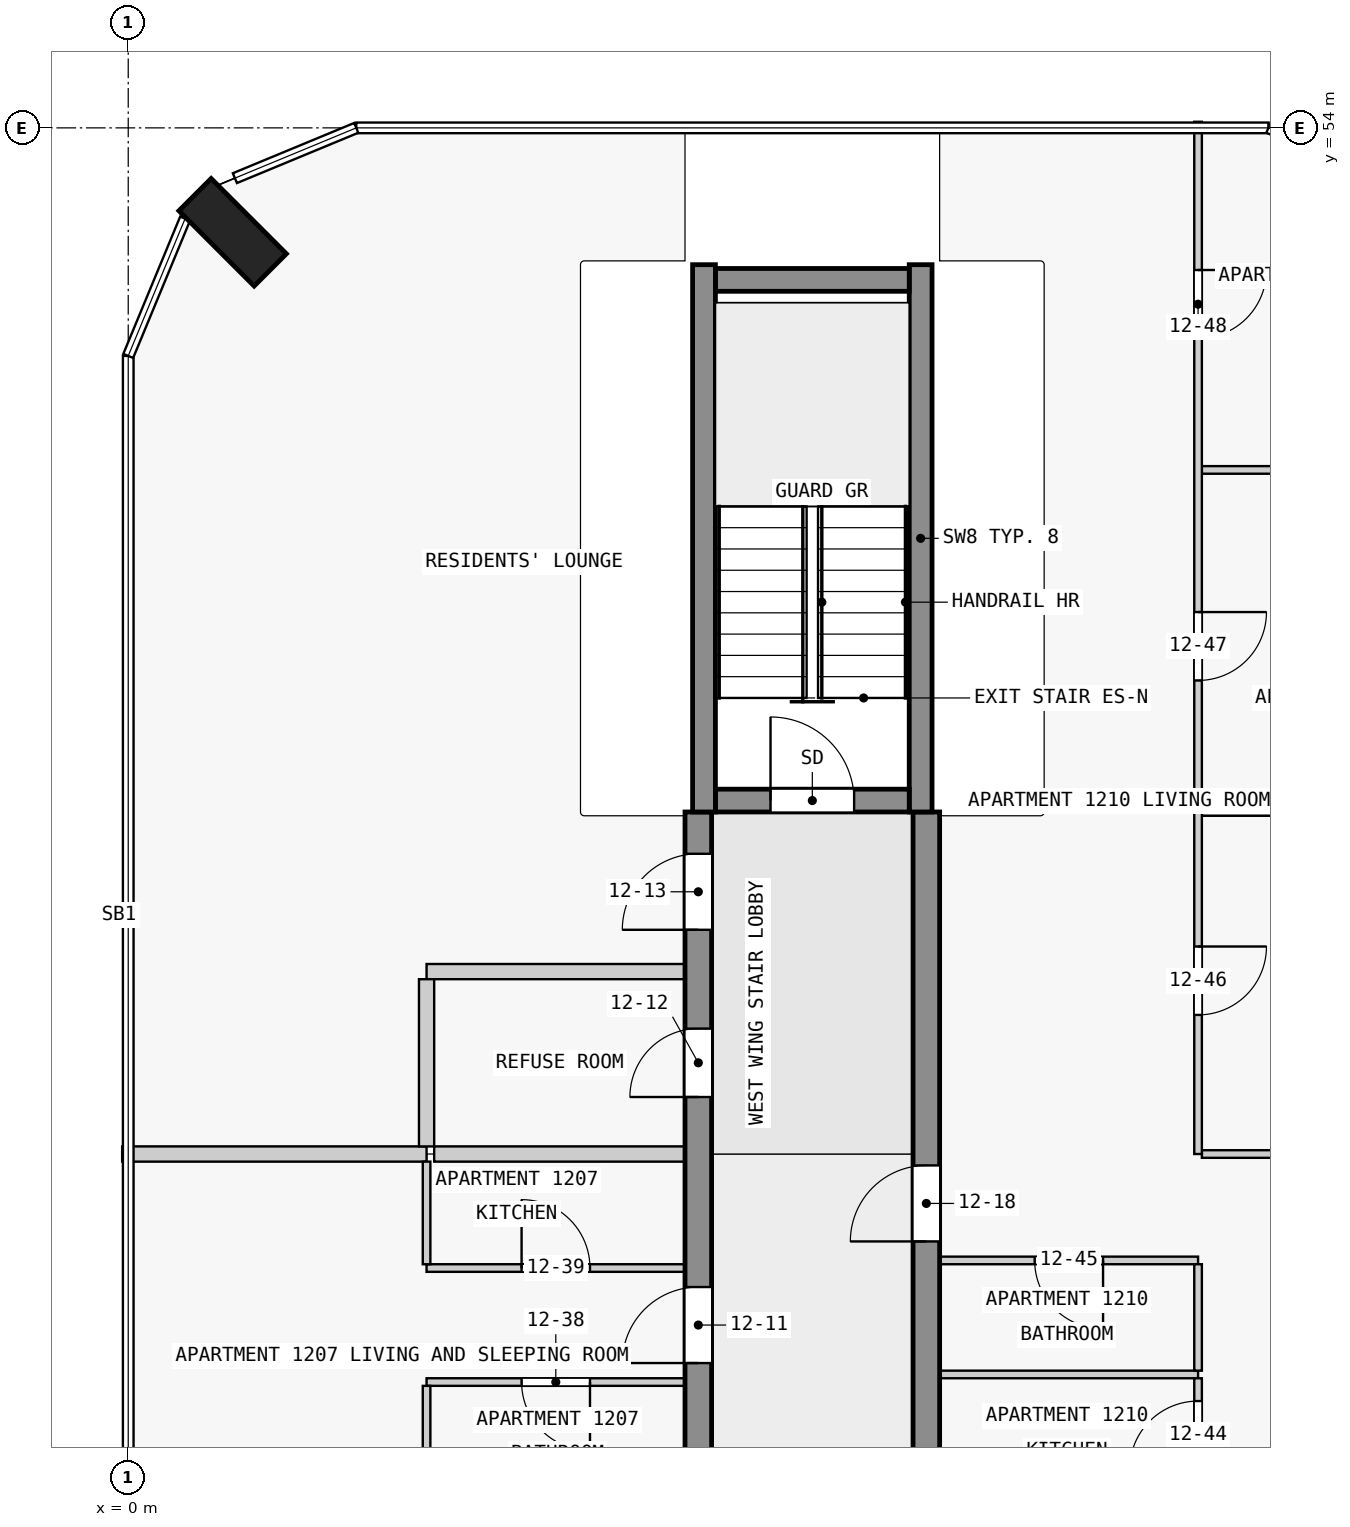
"""IFC4 building model, lengths in metres.
Left out: names, types, materials, properties, quantities, classifications, styles, units other than length and angle.
Written with IfcOpenShell. Run it as: python <this file> out.ifc"""

import sys

from ifc_helpers import new_model, si_unit, direction, frame, frame_2d, origin, origin_2d, place, context, subcontext, project, spatial, rectangle, extrude, element, fill, save


model = new_model("IFC4")
c1 = context("Model", 3, precision=1e-05, world=origin(), true_north=direction((0.0, 1.0)))
c2 = subcontext(c1, "Body", "Model", "MODEL_VIEW")
j1 = project(units=[si_unit("LENGTHUNIT", "METRE"), si_unit("PLANEANGLEUNIT", "RADIAN")], contexts=[c1])
p1 = place(None, origin())
s1 = spatial("IfcSite", under=j1, at=p1, CompositionType="ELEMENT")
p2 = place(p1, origin())
s2 = spatial("IfcBuilding", under=s1, at=p2, CompositionType="ELEMENT")
p3 = place(p2, frame((0.0, 0.0, 51.3)))
s3 = spatial("IfcBuildingStorey", under=s2, at=p3, CompositionType="ELEMENT", Elevation=51.3)
p4 = place(p3, frame((1.374, 52.626, 0.0), z_axis=(0.0, 0.0, 1.0), x_axis=(0.707106781187, 0.707106781187, 0.0)))
e1 = element("IfcColumn", 1, at=p4, inside=s3, PredefinedType="COLUMN", context=c2, shape_type="SweptSolid", body=[
    extrude(rectangle(XDim=0.6, YDim=1.4, at=origin_2d()), origin(), (0.0, 0.0, 1.0), 3.5),
])
p5 = place(p3, frame((7.725, 45.15, 0.0), z_axis=(0.0, 0.0, 1.0), x_axis=(1.0, 0.0, 0.0)))
e2 = element("IfcWall", 2, at=p5, inside=s3, PredefinedType="SHEAR", context=c2, shape_type="SweptSolid", body=[
    extrude(rectangle(XDim=2.55, YDim=0.3, at=frame_2d((1.275, 0.0))), origin(), (0.0, 0.0, 1.0), 3.5),
])
p6 = place(p5, frame((0.725, 0.0, 0.0)))
e3 = element("IfcOpeningElement", 3, at=p6, cuts=e2, PredefinedType="OPENING", context=c2, shape_type="SweptSolid", body=[
    extrude(rectangle(XDim=1.1, YDim=2.1, at=frame_2d((0.55, 1.05))), frame((0.0, 0.16, 0.0), z_axis=(0.0, -1.0, 0.0), x_axis=(1.0, 0.0, 0.0)), (0.0, 0.0, 1.0), 0.32),
])
p7 = place(p3, frame((7.725, 52.0, 0.0), z_axis=(0.0, 0.0, 1.0), x_axis=(1.0, 0.0, 0.0)))
e4 = element("IfcWall", 4, at=p7, inside=s3, PredefinedType="SHEAR", context=c2, shape_type="SweptSolid", body=[
    extrude(rectangle(XDim=2.55, YDim=0.3, at=frame_2d((1.275, 0.0))), origin(), (0.0, 0.0, 1.0), 3.5),
])
for number, where, z_axis, x_axis in (
    (5, (7.575, 45.0, 0.0), (0.0, 0.0, 1.0), (0.0, 1.0, 0.0)),
    (6, (10.425, 45.0, 0.0), (0.0, 0.0, 1.0), (0.0, 1.0, 0.0)),
):
    element("IfcWall", number, at=place(p3, frame(where, z_axis=z_axis, x_axis=x_axis)), inside=s3, PredefinedType="SHEAR", context=c2, shape_type="SweptSolid", body=[
        extrude(rectangle(XDim=7.2, YDim=0.3, at=frame_2d((3.6, 0.0))), origin(), (0.0, 0.0, 1.0), 3.5),
    ])
p8 = place(p3, frame((7.5, 18.0, 0.0), z_axis=(0.0, 0.0, 1.0), x_axis=(0.0, 1.0, 0.0)))
e7 = element("IfcWall", 7, at=p8, inside=s3, PredefinedType="SHEAR", context=c2, shape_type="SweptSolid", body=[
    extrude(rectangle(XDim=27.0, YDim=0.35, at=frame_2d((13.5, 0.0))), origin(), (0.0, 0.0, 1.0), 3.25),
])
p9 = place(p8, frame((4.75, 0.0, 0.0)))
e8 = element("IfcOpeningElement", 8, at=p9, cuts=e7, PredefinedType="OPENING", context=c2, shape_type="SweptSolid", body=[
    extrude(rectangle(XDim=1.0, YDim=2.1, at=frame_2d((0.5, 1.05))), frame((0.0, 0.185, 0.0), z_axis=(0.0, -1.0, 0.0), x_axis=(1.0, 0.0, 0.0)), (0.0, 0.0, 1.0), 0.37),
])
p10 = place(p8, frame((15.25, 0.0, 0.0)))
e9 = element("IfcOpeningElement", 9, at=p10, cuts=e7, PredefinedType="OPENING", context=c2, shape_type="SweptSolid", body=[
    extrude(rectangle(XDim=1.0, YDim=2.1, at=frame_2d((0.5, 1.05))), frame((0.0, 0.185, 0.0), z_axis=(0.0, -1.0, 0.0), x_axis=(1.0, 0.0, 0.0)), (0.0, 0.0, 1.0), 0.37),
])
p11 = place(p8, frame((19.75, 0.0, 0.0)))
e10 = element("IfcOpeningElement", 10, at=p11, cuts=e7, PredefinedType="OPENING", context=c2, shape_type="SweptSolid", body=[
    extrude(rectangle(XDim=1.0, YDim=2.1, at=frame_2d((0.5, 1.05))), frame((0.0, 0.185, 0.0), z_axis=(0.0, -1.0, 0.0), x_axis=(1.0, 0.0, 0.0)), (0.0, 0.0, 1.0), 0.37),
])
p12 = place(p8, frame((23.25, 0.0, 0.0)))
e11 = element("IfcOpeningElement", 11, at=p12, cuts=e7, PredefinedType="OPENING", context=c2, shape_type="SweptSolid", body=[
    extrude(rectangle(XDim=0.9, YDim=2.1, at=frame_2d((0.45, 1.05))), frame((0.0, 0.185, 0.0), z_axis=(0.0, -1.0, 0.0), x_axis=(1.0, 0.0, 0.0)), (0.0, 0.0, 1.0), 0.37),
])
p13 = place(p8, frame((25.45, 0.0, 0.0)))
e12 = element("IfcOpeningElement", 12, at=p13, cuts=e7, PredefinedType="OPENING", context=c2, shape_type="SweptSolid", body=[
    extrude(rectangle(XDim=1.0, YDim=2.1, at=frame_2d((0.5, 1.05))), frame((0.0, 0.185, 0.0), z_axis=(0.0, -1.0, 0.0), x_axis=(1.0, 0.0, 0.0)), (0.0, 0.0, 1.0), 0.37),
])
p14 = place(p3, frame((10.5, 18.0, 0.0), z_axis=(0.0, 0.0, 1.0), x_axis=(0.0, 1.0, 0.0)))
e13 = element("IfcWall", 13, at=p14, inside=s3, PredefinedType="SHEAR", context=c2, shape_type="SweptSolid", body=[
    extrude(rectangle(XDim=27.0, YDim=0.35, at=frame_2d((13.5, 0.0))), origin(), (0.0, 0.0, 1.0), 3.25),
])
p15 = place(p14, frame((1.75, 0.0, 0.0)))
e14 = element("IfcOpeningElement", 14, at=p15, cuts=e13, PredefinedType="OPENING", context=c2, shape_type="SweptSolid", body=[
    extrude(rectangle(XDim=1.0, YDim=2.1, at=frame_2d((0.5, 1.05))), frame((0.0, 0.185, 0.0), z_axis=(0.0, -1.0, 0.0), x_axis=(1.0, 0.0, 0.0)), (0.0, 0.0, 1.0), 0.37),
])
p16 = place(p14, frame((6.25, 0.0, 0.0)))
e15 = element("IfcOpeningElement", 15, at=p16, cuts=e13, PredefinedType="OPENING", context=c2, shape_type="SweptSolid", body=[
    extrude(rectangle(XDim=1.0, YDim=2.1, at=frame_2d((0.5, 1.05))), frame((0.0, 0.185, 0.0), z_axis=(0.0, -1.0, 0.0), x_axis=(1.0, 0.0, 0.0)), (0.0, 0.0, 1.0), 0.37),
])
p17 = place(p14, frame((10.75, 0.0, 0.0)))
e16 = element("IfcOpeningElement", 16, at=p17, cuts=e13, PredefinedType="OPENING", context=c2, shape_type="SweptSolid", body=[
    extrude(rectangle(XDim=1.0, YDim=2.1, at=frame_2d((0.5, 1.05))), frame((0.0, 0.185, 0.0), z_axis=(0.0, -1.0, 0.0), x_axis=(1.0, 0.0, 0.0)), (0.0, 0.0, 1.0), 0.37),
])
p18 = place(p14, frame((15.25, 0.0, 0.0)))
e17 = element("IfcOpeningElement", 17, at=p18, cuts=e13, PredefinedType="OPENING", context=c2, shape_type="SweptSolid", body=[
    extrude(rectangle(XDim=1.0, YDim=2.1, at=frame_2d((0.5, 1.05))), frame((0.0, 0.185, 0.0), z_axis=(0.0, -1.0, 0.0), x_axis=(1.0, 0.0, 0.0)), (0.0, 0.0, 1.0), 0.37),
])
p19 = place(p14, frame((21.35, 0.0, 0.0)))
e18 = element("IfcOpeningElement", 18, at=p19, cuts=e13, PredefinedType="OPENING", context=c2, shape_type="SweptSolid", body=[
    extrude(rectangle(XDim=1.0, YDim=2.1, at=frame_2d((0.5, 1.05))), frame((0.0, 0.185, 0.0), z_axis=(0.0, -1.0, 0.0), x_axis=(1.0, 0.0, 0.0)), (0.0, 0.0, 1.0), 0.37),
])
p20 = place(p3, frame((7.325, 37.5, 0.0), z_axis=(0.0, 0.0, 1.0), x_axis=(-1.0, 0.0, 0.0)))
e19 = element("IfcWall", 19, at=p20, inside=s3, PredefinedType="PARTITIONING", context=c2, shape_type="SweptSolid", body=[
    extrude(rectangle(XDim=3.4, YDim=0.1, at=frame_2d((1.7, 0.0))), origin(), (0.0, 0.0, 1.0), 3.25),
])
p21 = place(p20, frame((1.25, 0.0, 0.0)))
e20 = element("IfcOpeningElement", 20, at=p21, cuts=e19, PredefinedType="OPENING", context=c2, shape_type="SweptSolid", body=[
    extrude(rectangle(XDim=0.9, YDim=2.1, at=frame_2d((0.45, 1.05))), frame((0.0, 0.06, 0.0), z_axis=(0.0, -1.0, 0.0), x_axis=(1.0, 0.0, 0.0)), (0.0, 0.0, 1.0), 0.12),
])
p22 = place(p3, frame((14.075, 37.6, 0.0), z_axis=(0.0, 0.0, 1.0), x_axis=(-1.0, 0.0, 0.0)))
e21 = element("IfcWall", 21, at=p22, inside=s3, PredefinedType="PARTITIONING", context=c2, shape_type="SweptSolid", body=[
    extrude(rectangle(XDim=3.4, YDim=0.1, at=frame_2d((1.7, 0.0))), origin(), (0.0, 0.0, 1.0), 3.25),
])
p23 = place(p3, frame((3.925, 39.0, 0.0), z_axis=(0.0, 0.0, 1.0), x_axis=(1.0, 0.0, 0.0)))
e22 = element("IfcWall", 22, at=p23, inside=s3, PredefinedType="PARTITIONING", context=c2, shape_type="SweptSolid", body=[
    extrude(rectangle(XDim=3.4, YDim=0.1, at=frame_2d((1.7, 0.0))), origin(), (0.0, 0.0, 1.0), 3.25),
])
p24 = place(p23, frame((1.25, 0.0, 0.0)))
e23 = element("IfcOpeningElement", 23, at=p24, cuts=e22, PredefinedType="OPENING", context=c2, shape_type="SweptSolid", body=[
    extrude(rectangle(XDim=0.9, YDim=2.1, at=frame_2d((0.45, 1.05))), frame((0.0, 0.06, 0.0), z_axis=(0.0, -1.0, 0.0), x_axis=(1.0, 0.0, 0.0)), (0.0, 0.0, 1.0), 0.12),
])
p25 = place(p3, frame((14.075, 39.1, 0.0), z_axis=(0.0, 0.0, 1.0), x_axis=(-1.0, 0.0, 0.0)))
e24 = element("IfcWall", 24, at=p25, inside=s3, PredefinedType="PARTITIONING", context=c2, shape_type="SweptSolid", body=[
    extrude(rectangle(XDim=3.4, YDim=0.1, at=frame_2d((1.7, 0.0))), origin(), (0.0, 0.0, 1.0), 3.25),
])
p26 = place(p25, frame((1.25, 0.0, 0.0)))
e25 = element("IfcOpeningElement", 25, at=p26, cuts=e24, PredefinedType="OPENING", context=c2, shape_type="SweptSolid", body=[
    extrude(rectangle(XDim=0.9, YDim=2.1, at=frame_2d((0.45, 1.05))), frame((0.0, 0.06, 0.0), z_axis=(0.0, -1.0, 0.0), x_axis=(1.0, 0.0, 0.0)), (0.0, 0.0, 1.0), 0.12),
])
p27 = place(p3, frame((14.125, 40.5, 0.0), z_axis=(0.0, 0.0, 1.0), x_axis=(1.0, 0.0, 0.0)))
e26 = element("IfcWall", 26, at=p27, inside=s3, PredefinedType="PARTITIONING", context=c2, shape_type="SweptSolid", body=[
    extrude(rectangle(XDim=3.725, YDim=0.1, at=frame_2d((1.863, 0.0))), origin(), (0.0, 0.0, 1.0), 3.25),
])
p28 = place(p3, frame((7.325, 40.5, 0.0), z_axis=(0.0, 0.0, 1.0), x_axis=(-1.0, 0.0, 0.0)))
e27 = element("IfcWall", 27, at=p28, inside=s3, PredefinedType="PARTITIONING", context=c2, shape_type="SweptSolid", body=[
    extrude(rectangle(XDim=3.3, YDim=0.2, at=frame_2d((1.65, 0.0))), origin(), (0.0, 0.0, 1.0), 3.25),
])
p29 = place(p3, frame((-0.08, 40.5, 0.0), z_axis=(0.0, 0.0, 1.0), x_axis=(1.0, 0.0, 0.0)))
e28 = element("IfcWall", 28, at=p29, inside=s3, PredefinedType="PARTITIONING", context=c2, shape_type="SweptSolid", body=[
    extrude(rectangle(XDim=4.005, YDim=0.2, at=frame_2d((2.002, 0.0))), origin(), (0.0, 0.0, 1.0), 3.25),
])
p30 = place(p3, frame((7.325, 42.9, 0.0), z_axis=(0.0, 0.0, 1.0), x_axis=(-1.0, 0.0, 0.0)))
e29 = element("IfcWall", 29, at=p30, inside=s3, PredefinedType="PARTITIONING", context=c2, shape_type="SweptSolid", body=[
    extrude(rectangle(XDim=3.4, YDim=0.2, at=frame_2d((1.7, 0.0))), origin(), (0.0, 0.0, 1.0), 3.25),
])
p31 = place(p3, frame((17.85, 45.0, 0.0), z_axis=(0.0, 0.0, 1.0), x_axis=(-1.0, 0.0, 0.0)))
e30 = element("IfcWall", 30, at=p31, inside=s3, PredefinedType="PARTITIONING", context=c2, shape_type="SweptSolid", body=[
    extrude(rectangle(XDim=3.725, YDim=0.1, at=frame_2d((1.863, 0.0))), origin(), (0.0, 0.0, 1.0), 3.25),
])
p32 = place(p3, frame((18.08, 49.5, 0.0), z_axis=(0.0, 0.0, 1.0), x_axis=(-1.0, 0.0, 0.0)))
e31 = element("IfcWall", 31, at=p32, inside=s3, PredefinedType="PARTITIONING", context=c2, shape_type="SweptSolid", body=[
    extrude(rectangle(XDim=3.955, YDim=0.1, at=frame_2d((1.978, 0.0))), origin(), (0.0, 0.0, 1.0), 3.25),
])
for number, where, z_axis, x_axis in (
    (32, (3.925, 37.45, 0.0), (0.0, 0.0, 1.0), (0.0, -1.0, 0.0)),
    (33, (3.925, 40.4, 0.0), (0.0, 0.0, 1.0), (0.0, -1.0, 0.0)),
):
    element("IfcWall", number, at=place(p3, frame(where, z_axis=z_axis, x_axis=x_axis)), inside=s3, PredefinedType="PARTITIONING", context=c2, shape_type="SweptSolid", body=[
        extrude(rectangle(XDim=1.35, YDim=0.1, at=frame_2d((0.675, 0.0))), origin(), (0.0, 0.0, 1.0), 3.25),
    ])
p33 = place(p3, frame((3.925, 42.8, 0.0), z_axis=(0.0, 0.0, 1.0), x_axis=(0.0, -1.0, 0.0)))
e34 = element("IfcWall", 34, at=p33, inside=s3, PredefinedType="PARTITIONING", context=c2, shape_type="SweptSolid", body=[
    extrude(rectangle(XDim=2.2, YDim=0.2, at=frame_2d((1.1, 0.0))), origin(), (0.0, 0.0, 1.0), 3.25),
])
p34 = place(p3, frame((14.075, 54.08, 0.0), z_axis=(0.0, 0.0, 1.0), x_axis=(0.0, -1.0, 0.0)))
e35 = element("IfcWall", 35, at=p34, inside=s3, PredefinedType="PARTITIONING", context=c2, shape_type="SweptSolid", body=[
    extrude(rectangle(XDim=13.58, YDim=0.1, at=frame_2d((6.79, 0.0))), origin(), (0.0, 0.0, 1.0), 3.25),
])
p35 = place(p34, frame((10.85, 0.0, 0.0)))
e36 = element("IfcOpeningElement", 36, at=p35, cuts=e35, PredefinedType="OPENING", context=c2, shape_type="SweptSolid", body=[
    extrude(rectangle(XDim=0.9, YDim=2.1, at=frame_2d((0.45, 1.05))), frame((0.0, 0.06, 0.0), z_axis=(0.0, -1.0, 0.0), x_axis=(1.0, 0.0, 0.0)), (0.0, 0.0, 1.0), 0.12),
])
p36 = place(p34, frame((6.45, 0.0, 0.0)))
e37 = element("IfcOpeningElement", 37, at=p36, cuts=e35, PredefinedType="OPENING", context=c2, shape_type="SweptSolid", body=[
    extrude(rectangle(XDim=0.9, YDim=2.1, at=frame_2d((0.45, 1.05))), frame((0.0, 0.06, 0.0), z_axis=(0.0, -1.0, 0.0), x_axis=(1.0, 0.0, 0.0)), (0.0, 0.0, 1.0), 0.12),
])
p37 = place(p34, frame((1.95, 0.0, 0.0)))
e38 = element("IfcOpeningElement", 38, at=p37, cuts=e35, PredefinedType="OPENING", context=c2, shape_type="SweptSolid", body=[
    extrude(rectangle(XDim=0.9, YDim=2.1, at=frame_2d((0.45, 1.05))), frame((0.0, 0.06, 0.0), z_axis=(0.0, -1.0, 0.0), x_axis=(1.0, 0.0, 0.0)), (0.0, 0.0, 1.0), 0.12),
])
p38 = place(p3, frame((14.075, 36.1, 0.0), z_axis=(0.0, 0.0, 1.0), x_axis=(0.0, 1.0, 0.0)))
e39 = element("IfcWall", 39, at=p38, inside=s3, PredefinedType="PARTITIONING", context=c2, shape_type="SweptSolid", body=[
    extrude(rectangle(XDim=1.45, YDim=0.1, at=frame_2d((0.725, 0.0))), origin(), (0.0, 0.0, 1.0), 3.25),
])
p39 = place(p38, frame((0.25, 0.0, 0.0)))
e40 = element("IfcOpeningElement", 40, at=p39, cuts=e39, PredefinedType="OPENING", context=c2, shape_type="SweptSolid", body=[
    extrude(rectangle(XDim=0.9, YDim=2.1, at=frame_2d((0.45, 1.05))), frame((0.0, 0.06, 0.0), z_axis=(0.0, -1.0, 0.0), x_axis=(1.0, 0.0, 0.0)), (0.0, 0.0, 1.0), 0.12),
])
p40 = place(p3, frame((14.075, 37.65, 0.0), z_axis=(0.0, 0.0, 1.0), x_axis=(0.0, 1.0, 0.0)))
e41 = element("IfcWall", 41, at=p40, inside=s3, PredefinedType="PARTITIONING", context=c2, shape_type="SweptSolid", body=[
    extrude(rectangle(XDim=1.4, YDim=0.1, at=frame_2d((0.7, 0.0))), origin(), (0.0, 0.0, 1.0), 3.25),
])
p41 = place(p6, origin())
e42 = element("IfcDoor", 42, at=p41, inside=s3, OperationType="SINGLE_SWING_LEFT", PredefinedType="DOOR", context=c2, shape_type="SweptSolid", body=[
    extrude(rectangle(XDim=1.1, YDim=2.1, at=frame_2d((0.55, 1.05))), frame((0.0, 0.025, 0.0), z_axis=(0.0, -1.0, 0.0), x_axis=(1.0, 0.0, 0.0)), (0.0, 0.0, 1.0), 0.05),
])
fill(e3, e42)
p42 = place(p11, origin())
e43 = element("IfcDoor", 43, at=p42, inside=s3, OperationType="SINGLE_SWING_RIGHT", PredefinedType="DOOR", context=c2, shape_type="SweptSolid", body=[
    extrude(rectangle(XDim=1.0, YDim=2.1, at=frame_2d((0.5, 1.05))), frame((0.0, 0.025, 0.0), z_axis=(0.0, -1.0, 0.0), x_axis=(1.0, 0.0, 0.0)), (0.0, 0.0, 1.0), 0.05),
])
fill(e10, e43)
p43 = place(p12, origin())
e44 = element("IfcDoor", 44, at=p43, inside=s3, OperationType="SINGLE_SWING_RIGHT", PredefinedType="DOOR", context=c2, shape_type="SweptSolid", body=[
    extrude(rectangle(XDim=0.9, YDim=2.1, at=frame_2d((0.45, 1.05))), frame((0.0, 0.025, 0.0), z_axis=(0.0, -1.0, 0.0), x_axis=(1.0, 0.0, 0.0)), (0.0, 0.0, 1.0), 0.05),
])
fill(e11, e44)
p44 = place(p13, origin())
e45 = element("IfcDoor", 45, at=p44, inside=s3, OperationType="SINGLE_SWING_RIGHT", PredefinedType="DOOR", context=c2, shape_type="SweptSolid", body=[
    extrude(rectangle(XDim=1.0, YDim=2.1, at=frame_2d((0.5, 1.05))), frame((0.0, 0.025, 0.0), z_axis=(0.0, -1.0, 0.0), x_axis=(1.0, 0.0, 0.0)), (0.0, 0.0, 1.0), 0.05),
])
fill(e12, e45)
p45 = place(p19, origin())
e46 = element("IfcDoor", 46, at=p45, inside=s3, OperationType="SINGLE_SWING_RIGHT", PredefinedType="DOOR", context=c2, shape_type="SweptSolid", body=[
    extrude(rectangle(XDim=1.0, YDim=2.1, at=frame_2d((0.5, 1.05))), frame((0.0, 0.025, 0.0), z_axis=(0.0, -1.0, 0.0), x_axis=(1.0, 0.0, 0.0)), (0.0, 0.0, 1.0), 0.05),
])
fill(e18, e46)
p46 = place(p21, origin())
e47 = element("IfcDoor", 47, at=p46, inside=s3, OperationType="SINGLE_SWING_LEFT", PredefinedType="DOOR", context=c2, shape_type="SweptSolid", body=[
    extrude(rectangle(XDim=0.9, YDim=2.1, at=frame_2d((0.45, 1.05))), frame((0.0, 0.025, 0.0), z_axis=(0.0, -1.0, 0.0), x_axis=(1.0, 0.0, 0.0)), (0.0, 0.0, 1.0), 0.05),
])
fill(e20, e47)
p47 = place(p24, origin())
e48 = element("IfcDoor", 48, at=p47, inside=s3, OperationType="SINGLE_SWING_LEFT", PredefinedType="DOOR", context=c2, shape_type="SweptSolid", body=[
    extrude(rectangle(XDim=0.9, YDim=2.1, at=frame_2d((0.45, 1.05))), frame((0.0, 0.025, 0.0), z_axis=(0.0, -1.0, 0.0), x_axis=(1.0, 0.0, 0.0)), (0.0, 0.0, 1.0), 0.05),
])
fill(e23, e48)
p48 = place(p39, origin())
e49 = element("IfcDoor", 49, at=p48, inside=s3, OperationType="SINGLE_SWING_LEFT", PredefinedType="DOOR", context=c2, shape_type="SweptSolid", body=[
    extrude(rectangle(XDim=0.9, YDim=2.1, at=frame_2d((0.45, 1.05))), frame((0.0, 0.025, 0.0), z_axis=(0.0, -1.0, 0.0), x_axis=(1.0, 0.0, 0.0)), (0.0, 0.0, 1.0), 0.05),
])
fill(e40, e49)
p49 = place(p26, origin())
e50 = element("IfcDoor", 50, at=p49, inside=s3, OperationType="SINGLE_SWING_RIGHT", PredefinedType="DOOR", context=c2, shape_type="SweptSolid", body=[
    extrude(rectangle(XDim=0.9, YDim=2.1, at=frame_2d((0.45, 1.05))), frame((0.0, 0.025, 0.0), z_axis=(0.0, -1.0, 0.0), x_axis=(1.0, 0.0, 0.0)), (0.0, 0.0, 1.0), 0.05),
])
fill(e25, e50)
p50 = place(p35, origin())
e51 = element("IfcDoor", 51, at=p50, inside=s3, OperationType="SINGLE_SWING_RIGHT", PredefinedType="DOOR", context=c2, shape_type="SweptSolid", body=[
    extrude(rectangle(XDim=0.9, YDim=2.1, at=frame_2d((0.45, 1.05))), frame((0.0, 0.025, 0.0), z_axis=(0.0, -1.0, 0.0), x_axis=(1.0, 0.0, 0.0)), (0.0, 0.0, 1.0), 0.05),
])
fill(e36, e51)
p51 = place(p36, origin())
e52 = element("IfcDoor", 52, at=p51, inside=s3, OperationType="SINGLE_SWING_RIGHT", PredefinedType="DOOR", context=c2, shape_type="SweptSolid", body=[
    extrude(rectangle(XDim=0.9, YDim=2.1, at=frame_2d((0.45, 1.05))), frame((0.0, 0.025, 0.0), z_axis=(0.0, -1.0, 0.0), x_axis=(1.0, 0.0, 0.0)), (0.0, 0.0, 1.0), 0.05),
])
fill(e37, e52)
p52 = place(p37, origin())
e53 = element("IfcDoor", 53, at=p52, inside=s3, OperationType="SINGLE_SWING_LEFT", PredefinedType="DOOR", context=c2, shape_type="SweptSolid", body=[
    extrude(rectangle(XDim=0.9, YDim=2.1, at=frame_2d((0.45, 1.05))), frame((0.0, 0.025, 0.0), z_axis=(0.0, -1.0, 0.0), x_axis=(1.0, 0.0, 0.0)), (0.0, 0.0, 1.0), 0.05),
])
fill(e38, e53)
save(model, sys.argv[1])
